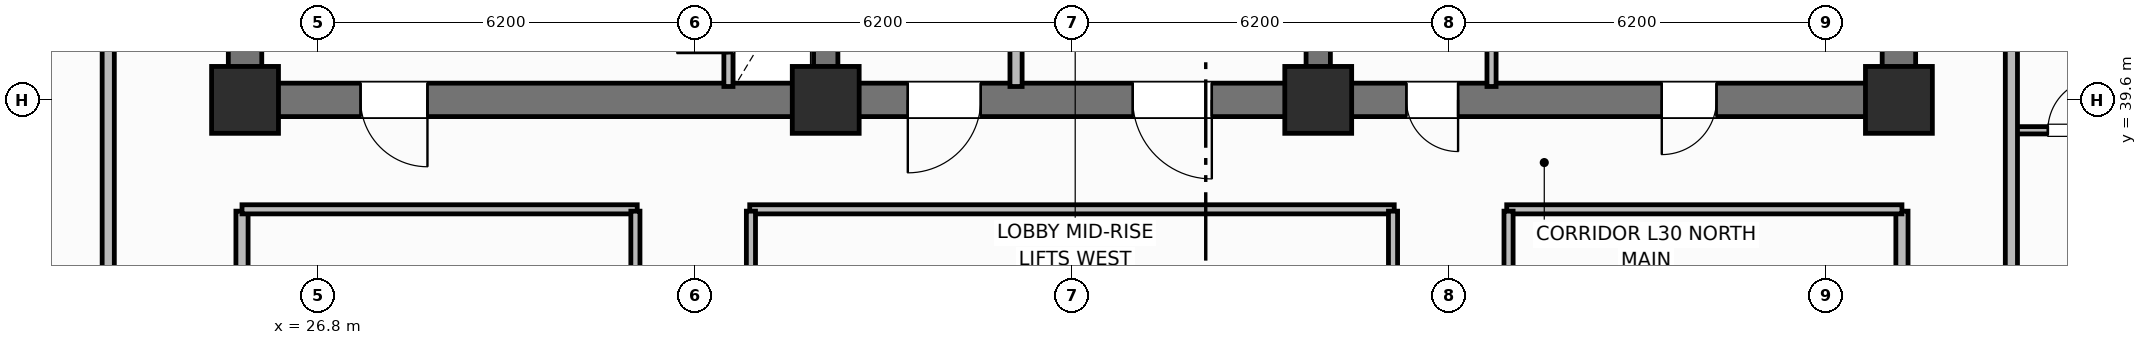
"""IFC4 building model, lengths in metres.
Left out: names, types, materials, properties, quantities, classifications, styles, units other than length and angle.
Written with IfcOpenShell. Run it as: python <this file> out.ifc"""

import sys

from ifc_helpers import new_model, si_unit, direction, frame, frame_2d, origin, origin_2d, place, context, subcontext, project, spatial, rectangle, extrude, element, fill, save


model = new_model("IFC4")
c1 = context("Model", 3, precision=1e-05, world=origin(), true_north=direction((0.0, 1.0)))
c2 = subcontext(c1, "Body", "Model", "MODEL_VIEW")
j1 = project(units=[si_unit("LENGTHUNIT", "METRE"), si_unit("PLANEANGLEUNIT", "RADIAN")], contexts=[c1])
p1 = place(None, origin())
s1 = spatial("IfcSite", under=j1, at=p1, CompositionType="ELEMENT")
p2 = place(p1, origin())
s2 = spatial("IfcBuilding", under=s1, at=p2, CompositionType="ELEMENT")
p3 = place(p2, frame((0.0, 0.0, 121.6)))
s3 = spatial("IfcBuildingStorey", under=s2, at=p3, CompositionType="ELEMENT", Elevation=121.6)
for number, where, z_axis, x_axis in (
    (1, (25.6, 39.875, 0.0), (0.0, 0.0, 1.0), (0.0, 1.0, 0.0)),
    (2, (52.8, 39.875, 0.0), (0.0, 0.0, 1.0), (0.0, 1.0, 0.0)),
):
    element("IfcWall", number, at=place(p3, frame(where, z_axis=z_axis, x_axis=x_axis)), inside=s3, PredefinedType="SHEAR", context=c2, shape_type="SweptSolid", body=[
        extrude(rectangle(XDim=5.65, YDim=0.55, at=frame_2d((2.825, 0.0))), origin(), (0.0, 0.0, 1.0), 3.7),
    ])
p4 = place(p3, frame((52.8, 39.6, 0.0), z_axis=(0.0, 0.0, 1.0), x_axis=(-1.0, 0.0, 0.0)))
e3 = element("IfcWall", 3, at=p4, inside=s3, PredefinedType="SHEAR", context=c2, shape_type="SweptSolid", body=[
    extrude(rectangle(XDim=27.2, YDim=0.55, at=frame_2d((13.6, 0.0))), origin(), (0.0, 0.0, 1.0), 3.7),
])
p5 = place(p4, frame((24.2, 0.0, 0.0)))
e4 = element("IfcOpeningElement", 4, at=p5, cuts=e3, PredefinedType="OPENING", context=c2, shape_type="SweptSolid", body=[
    extrude(rectangle(XDim=1.1, YDim=2.15, at=frame_2d((0.55, 1.075))), frame((0.0, 0.285, 0.0), z_axis=(0.0, -1.0, 0.0), x_axis=(1.0, 0.0, 0.0)), (0.0, 0.0, 1.0), 0.57),
])
p6 = place(p4, frame((15.1, 0.0, 0.0)))
e5 = element("IfcOpeningElement", 5, at=p6, cuts=e3, PredefinedType="OPENING", context=c2, shape_type="SweptSolid", body=[
    extrude(rectangle(XDim=1.2, YDim=2.15, at=frame_2d((0.6, 1.075))), frame((0.0, 0.285, 0.0), z_axis=(0.0, -1.0, 0.0), x_axis=(1.0, 0.0, 0.0)), (0.0, 0.0, 1.0), 0.57),
])
p7 = place(p4, frame((11.3, 0.0, 0.0)))
e6 = element("IfcOpeningElement", 6, at=p7, cuts=e3, PredefinedType="OPENING", context=c2, shape_type="SweptSolid", body=[
    extrude(rectangle(XDim=1.3, YDim=2.2, at=frame_2d((0.65, 1.1))), frame((0.0, 0.285, 0.0), z_axis=(0.0, -1.0, 0.0), x_axis=(1.0, 0.0, 0.0)), (0.0, 0.0, 1.0), 0.57),
])
p8 = place(p4, frame((7.25, 0.0, 0.0)))
e7 = element("IfcOpeningElement", 7, at=p8, cuts=e3, PredefinedType="OPENING", context=c2, shape_type="SweptSolid", body=[
    extrude(rectangle(XDim=0.85, YDim=2.1, at=frame_2d((0.425, 1.05))), frame((0.0, 0.285, 0.0), z_axis=(0.0, -1.0, 0.0), x_axis=(1.0, 0.0, 0.0)), (0.0, 0.0, 1.0), 0.57),
])
p9 = place(p4, frame((3.0, 0.0, 0.0)))
e8 = element("IfcOpeningElement", 8, at=p9, cuts=e3, PredefinedType="OPENING", context=c2, shape_type="SweptSolid", body=[
    extrude(rectangle(XDim=0.9, YDim=2.1, at=frame_2d((0.45, 1.05))), frame((0.0, 0.285, 0.0), z_axis=(0.0, -1.0, 0.0), x_axis=(1.0, 0.0, 0.0)), (0.0, 0.0, 1.0), 0.57),
])
for number, where, z_axis, x_axis in (
    (9, (35.15, 39.875, 0.0), (0.0, 0.0, 1.0), (0.0, 1.0, 0.0)),
    (10, (43.25, 39.875, 0.0), (0.0, 0.0, 1.0), (0.0, 1.0, 0.0)),
):
    element("IfcWall", number, at=place(p3, frame(where, z_axis=z_axis, x_axis=x_axis)), inside=s3, PredefinedType="SHEAR", context=c2, shape_type="SweptSolid", body=[
        extrude(rectangle(XDim=5.65, YDim=0.4, at=frame_2d((2.825, 0.0))), origin(), (0.0, 0.0, 1.0), 3.7),
    ])
for number, where, z_axis, x_axis in (
    (11, (25.6, 39.6, 0.0), (0.0, 0.0, 1.0), (1.0, 0.0, 0.0)),
    (12, (35.15, 39.6, 0.0), (0.0, 0.0, 1.0), (1.0, 0.0, 0.0)),
    (13, (43.25, 39.6, 0.0), (0.0, 0.0, 1.0), (1.0, 0.0, 0.0)),
    (14, (52.8, 39.6, 0.0), (0.0, 0.0, 1.0), (1.0, 0.0, 0.0)),
):
    element("IfcColumn", number, at=place(p3, frame(where, z_axis=z_axis, x_axis=x_axis)), inside=s3, PredefinedType="COLUMN", context=c2, shape_type="SweptSolid", body=[
        extrude(rectangle(XDim=1.1, YDim=1.1, at=origin_2d()), origin(), (0.0, 0.0, 1.0), 3.7),
    ])
p10 = place(p3, frame((33.55, 39.82, 0.0), z_axis=(0.0, 0.0, 1.0), x_axis=(0.0, 1.0, 0.0)))
e15 = element("IfcWall", 15, at=p10, inside=s3, PredefinedType="PARTITIONING", context=c2, shape_type="SweptSolid", body=[
    extrude(rectangle(XDim=2.13, YDim=0.15, at=frame_2d((1.065, 0.0))), origin(), (0.0, 0.0, 1.0), 2.53),
])
p11 = place(p10, frame((0.55, 0.0, 0.0)))
e16 = element("IfcOpeningElement", 16, at=p11, cuts=e15, PredefinedType="OPENING", context=c2, shape_type="SweptSolid", body=[
    extrude(rectangle(XDim=0.85, YDim=2.05, at=frame_2d((0.425, 1.025))), frame((0.0, 0.085, 0.0), z_axis=(0.0, -1.0, 0.0), x_axis=(1.0, 0.0, 0.0)), (0.0, 0.0, 1.0), 0.17),
])
p12 = place(p3, frame((38.28, 39.82, 0.0), z_axis=(0.0, 0.0, 1.0), x_axis=(0.0, 1.0, 0.0)))
e17 = element("IfcWall", 17, at=p12, inside=s3, PredefinedType="PARTITIONING", context=c2, shape_type="SweptSolid", body=[
    extrude(rectangle(XDim=2.73, YDim=0.2, at=frame_2d((1.365, 0.0))), origin(), (0.0, 0.0, 1.0), 2.53),
])
p13 = place(p3, frame((46.1, 39.82, 0.0), z_axis=(0.0, 0.0, 1.0), x_axis=(0.0, 1.0, 0.0)))
e18 = element("IfcWall", 18, at=p13, inside=s3, PredefinedType="PARTITIONING", context=c2, shape_type="SweptSolid", body=[
    extrude(rectangle(XDim=2.73, YDim=0.15, at=frame_2d((1.365, 0.0))), origin(), (0.0, 0.0, 1.0), 2.53),
])
for number, where, z_axis, x_axis in (
    (19, (25.55, 18.63, 0.0), (0.0, 0.0, 1.0), (0.0, 1.0, 0.0)),
    (20, (52.85, 18.63, 0.0), (0.0, 0.0, 1.0), (0.0, 1.0, 0.0)),
):
    element("IfcWall", number, at=place(p3, frame(where, z_axis=z_axis, x_axis=x_axis)), inside=s3, PredefinedType="PARTITIONING", context=c2, shape_type="SweptSolid", body=[
        extrude(rectangle(XDim=19.14, YDim=0.2, at=frame_2d((9.57, 0.0))), origin(), (0.0, 0.0, 1.0), 2.53),
    ])
p14 = place(p3, frame((25.55, 37.8, 0.0), z_axis=(0.0, 0.0, 1.0), x_axis=(1.0, 0.0, 0.0)))
e21 = element("IfcWall", 21, at=p14, inside=s3, PredefinedType="PARTITIONING", context=c2, shape_type="SweptSolid", body=[
    extrude(rectangle(XDim=6.5, YDim=0.15, at=frame_2d((3.25, 0.0))), origin(), (0.0, 0.0, 1.0), 2.53),
])
p15 = place(p3, frame((33.9, 37.8, 0.0), z_axis=(0.0, 0.0, 1.0), x_axis=(1.0, 0.0, 0.0)))
e22 = element("IfcWall", 22, at=p15, inside=s3, PredefinedType="PARTITIONING", context=c2, shape_type="SweptSolid", body=[
    extrude(rectangle(XDim=10.6, YDim=0.15, at=frame_2d((5.3, 0.0))), origin(), (0.0, 0.0, 1.0), 2.53),
])
p16 = place(p3, frame((46.35, 37.8, 0.0), z_axis=(0.0, 0.0, 1.0), x_axis=(1.0, 0.0, 0.0)))
e23 = element("IfcWall", 23, at=p16, inside=s3, PredefinedType="PARTITIONING", context=c2, shape_type="SweptSolid", body=[
    extrude(rectangle(XDim=6.5, YDim=0.15, at=frame_2d((3.25, 0.0))), origin(), (0.0, 0.0, 1.0), 2.53),
])
p17 = place(p3, frame((32.02, 18.63, 0.0), z_axis=(0.0, 0.0, 1.0), x_axis=(0.0, 1.0, 0.0)))
e24 = element("IfcWall", 24, at=p17, inside=s3, PredefinedType="PARTITIONING", context=c2, shape_type="SweptSolid", body=[
    extrude(rectangle(XDim=19.14, YDim=0.15, at=frame_2d((9.57, 0.0))), origin(), (0.0, 0.0, 1.0), 2.53),
])
p18 = place(p17, frame((5.0, 0.0, 0.0)))
e25 = element("IfcOpeningElement", 25, at=p18, cuts=e24, PredefinedType="OPENING", context=c2, shape_type="SweptSolid", body=[
    extrude(rectangle(XDim=0.9, YDim=2.1, at=frame_2d((0.45, 1.05))), frame((0.0, 0.085, 0.0), z_axis=(0.0, -1.0, 0.0), x_axis=(1.0, 0.0, 0.0)), (0.0, 0.0, 1.0), 0.17),
])
p19 = place(p3, frame((33.92, 18.63, 0.0), z_axis=(0.0, 0.0, 1.0), x_axis=(0.0, 1.0, 0.0)))
e26 = element("IfcWall", 26, at=p19, inside=s3, PredefinedType="PARTITIONING", context=c2, shape_type="SweptSolid", body=[
    extrude(rectangle(XDim=19.14, YDim=0.15, at=frame_2d((9.57, 0.0))), origin(), (0.0, 0.0, 1.0), 2.53),
])
p20 = place(p19, frame((6.5, 0.0, 0.0)))
e27 = element("IfcOpeningElement", 27, at=p20, cuts=e26, PredefinedType="OPENING", context=c2, shape_type="SweptSolid", body=[
    extrude(rectangle(XDim=1.0, YDim=2.15, at=frame_2d((0.5, 1.075))), frame((0.0, 0.085, 0.0), z_axis=(0.0, -1.0, 0.0), x_axis=(1.0, 0.0, 0.0)), (0.0, 0.0, 1.0), 0.17),
])
p21 = place(p3, frame((44.48, 18.63, 0.0), z_axis=(0.0, 0.0, 1.0), x_axis=(0.0, 1.0, 0.0)))
e28 = element("IfcWall", 28, at=p21, inside=s3, PredefinedType="PARTITIONING", context=c2, shape_type="SweptSolid", body=[
    extrude(rectangle(XDim=19.14, YDim=0.15, at=frame_2d((9.57, 0.0))), origin(), (0.0, 0.0, 1.0), 2.53),
])
p22 = place(p3, frame((46.38, 18.63, 0.0), z_axis=(0.0, 0.0, 1.0), x_axis=(0.0, 1.0, 0.0)))
e29 = element("IfcWall", 29, at=p22, inside=s3, PredefinedType="PARTITIONING", context=c2, shape_type="SweptSolid", body=[
    extrude(rectangle(XDim=19.14, YDim=0.15, at=frame_2d((9.57, 0.0))), origin(), (0.0, 0.0, 1.0), 2.53),
])
p23 = place(p22, frame((3.0, 0.0, 0.0)))
e30 = element("IfcOpeningElement", 30, at=p23, cuts=e29, PredefinedType="OPENING", context=c2, shape_type="SweptSolid", body=[
    extrude(rectangle(XDim=0.9, YDim=2.1, at=frame_2d((0.45, 1.05))), frame((0.0, 0.085, 0.0), z_axis=(0.0, -1.0, 0.0), x_axis=(1.0, 0.0, 0.0)), (0.0, 0.0, 1.0), 0.17),
])
p24 = place(p22, frame((11.5, 0.0, 0.0)))
e31 = element("IfcOpeningElement", 31, at=p24, cuts=e29, PredefinedType="OPENING", context=c2, shape_type="SweptSolid", body=[
    extrude(rectangle(XDim=0.9, YDim=2.1, at=frame_2d((0.45, 1.05))), frame((0.0, 0.085, 0.0), z_axis=(0.0, -1.0, 0.0), x_axis=(1.0, 0.0, 0.0)), (0.0, 0.0, 1.0), 0.17),
])
p25 = place(p3, frame((23.35, 10.6, 0.0), z_axis=(0.0, 0.0, 1.0), x_axis=(0.0, 1.0, 0.0)))
e32 = element("IfcWall", 32, at=p25, inside=s3, PredefinedType="PARTITIONING", context=c2, shape_type="SweptSolid", body=[
    extrude(rectangle(XDim=35.2, YDim=0.2, at=frame_2d((17.6, 0.0))), origin(), (0.0, 0.0, 1.0), 2.53),
])
p26 = place(p25, frame((2.65, 0.0, 0.0)))
e33 = element("IfcOpeningElement", 33, at=p26, cuts=e32, PredefinedType="OPENING", context=c2, shape_type="SweptSolid", body=[
    extrude(rectangle(XDim=1.0, YDim=2.15, at=frame_2d((0.5, 1.075))), frame((0.0, 0.11, 0.0), z_axis=(0.0, -1.0, 0.0), x_axis=(1.0, 0.0, 0.0)), (0.0, 0.0, 1.0), 0.22),
])
p27 = place(p25, frame((19.95, 0.0, 0.0)))
e34 = element("IfcOpeningElement", 34, at=p27, cuts=e32, PredefinedType="OPENING", context=c2, shape_type="SweptSolid", body=[
    extrude(rectangle(XDim=1.0, YDim=2.15, at=frame_2d((0.5, 1.075))), frame((0.0, 0.11, 0.0), z_axis=(0.0, -1.0, 0.0), x_axis=(1.0, 0.0, 0.0)), (0.0, 0.0, 1.0), 0.22),
])
p28 = place(p3, frame((54.65, 39.1, 0.0), z_axis=(0.0, 0.0, 1.0), x_axis=(1.0, 0.0, 0.0)))
e35 = element("IfcWall", 35, at=p28, inside=s3, PredefinedType="PARTITIONING", context=c2, shape_type="SweptSolid", body=[
    extrude(rectangle(XDim=2.25, YDim=0.12, at=frame_2d((1.125, 0.0))), origin(), (0.0, 0.0, 1.0), 2.53),
])
p29 = place(p28, frame((0.6, 0.0, 0.0)))
e36 = element("IfcOpeningElement", 36, at=p29, cuts=e35, PredefinedType="OPENING", context=c2, shape_type="SweptSolid", body=[
    extrude(rectangle(XDim=0.85, YDim=2.1, at=frame_2d((0.425, 1.05))), frame((0.0, 0.07, 0.0), z_axis=(0.0, -1.0, 0.0), x_axis=(1.0, 0.0, 0.0)), (0.0, 0.0, 1.0), 0.14),
])
p30 = place(p3, frame((54.65, 10.6, 0.0), z_axis=(0.0, 0.0, 1.0), x_axis=(0.0, 1.0, 0.0)))
e37 = element("IfcWall", 37, at=p30, inside=s3, PredefinedType="PARTITIONING", context=c2, shape_type="SweptSolid", body=[
    extrude(rectangle(XDim=35.2, YDim=0.2, at=frame_2d((17.6, 0.0))), origin(), (0.0, 0.0, 1.0), 2.53),
])
p31 = place(p30, frame((2.65, 0.0, 0.0)))
e38 = element("IfcOpeningElement", 38, at=p31, cuts=e37, PredefinedType="OPENING", context=c2, shape_type="SweptSolid", body=[
    extrude(rectangle(XDim=1.0, YDim=2.15, at=frame_2d((0.5, 1.075))), frame((0.0, 0.11, 0.0), z_axis=(0.0, -1.0, 0.0), x_axis=(1.0, 0.0, 0.0)), (0.0, 0.0, 1.0), 0.22),
])
p32 = place(p30, frame((12.518, 0.0, 0.0)))
e39 = element("IfcOpeningElement", 39, at=p32, cuts=e37, PredefinedType="OPENING", context=c2, shape_type="SweptSolid", body=[
    extrude(rectangle(XDim=1.0, YDim=2.15, at=frame_2d((0.5, 1.075))), frame((0.0, 0.11, 0.0), z_axis=(0.0, -1.0, 0.0), x_axis=(1.0, 0.0, 0.0)), (0.0, 0.0, 1.0), 0.22),
])
p33 = place(p30, frame((23.65, 0.0, 0.0)))
e40 = element("IfcOpeningElement", 40, at=p33, cuts=e37, PredefinedType="OPENING", context=c2, shape_type="SweptSolid", body=[
    extrude(rectangle(XDim=1.0, YDim=2.15, at=frame_2d((0.5, 1.075))), frame((0.0, 0.11, 0.0), z_axis=(0.0, -1.0, 0.0), x_axis=(1.0, 0.0, 0.0)), (0.0, 0.0, 1.0), 0.22),
])
p34 = place(p11, origin())
e41 = element("IfcDoor", 41, at=p34, inside=s3, OperationType="SINGLE_SWING_LEFT", PredefinedType="TRAPDOOR", context=c2, shape_type="SweptSolid", body=[
    extrude(rectangle(XDim=0.85, YDim=2.05, at=frame_2d((0.425, 1.025))), frame((0.0, 0.025, 0.0), z_axis=(0.0, -1.0, 0.0), x_axis=(1.0, 0.0, 0.0)), (0.0, 0.0, 1.0), 0.05),
])
fill(e16, e41)
p35 = place(p29, origin())
e42 = element("IfcDoor", 42, at=p35, inside=s3, OperationType="SINGLE_SWING_RIGHT", PredefinedType="DOOR", context=c2, shape_type="SweptSolid", body=[
    extrude(rectangle(XDim=0.85, YDim=2.1, at=frame_2d((0.425, 1.05))), frame((0.0, 0.025, 0.0), z_axis=(0.0, -1.0, 0.0), x_axis=(1.0, 0.0, 0.0)), (0.0, 0.0, 1.0), 0.05),
])
fill(e36, e42)
p36 = place(p5, origin())
e43 = element("IfcDoor", 43, at=p36, inside=s3, OperationType="SINGLE_SWING_LEFT", PredefinedType="DOOR", context=c2, shape_type="SweptSolid", body=[
    extrude(rectangle(XDim=1.1, YDim=2.15, at=frame_2d((0.55, 1.075))), frame((0.0, 0.025, 0.0), z_axis=(0.0, -1.0, 0.0), x_axis=(1.0, 0.0, 0.0)), (0.0, 0.0, 1.0), 0.05),
])
fill(e4, e43)
p37 = place(p6, origin())
e44 = element("IfcDoor", 44, at=p37, inside=s3, OperationType="SINGLE_SWING_RIGHT", PredefinedType="DOOR", context=c2, shape_type="SweptSolid", body=[
    extrude(rectangle(XDim=1.2, YDim=2.15, at=frame_2d((0.6, 1.075))), frame((0.0, 0.025, 0.0), z_axis=(0.0, -1.0, 0.0), x_axis=(1.0, 0.0, 0.0)), (0.0, 0.0, 1.0), 0.05),
])
fill(e5, e44)
p38 = place(p7, origin())
e45 = element("IfcDoor", 45, at=p38, inside=s3, OperationType="SINGLE_SWING_LEFT", PredefinedType="DOOR", context=c2, shape_type="SweptSolid", body=[
    extrude(rectangle(XDim=1.3, YDim=2.2, at=frame_2d((0.65, 1.1))), frame((0.0, 0.025, 0.0), z_axis=(0.0, -1.0, 0.0), x_axis=(1.0, 0.0, 0.0)), (0.0, 0.0, 1.0), 0.05),
])
fill(e6, e45)
p39 = place(p8, origin())
e46 = element("IfcDoor", 46, at=p39, inside=s3, OperationType="SINGLE_SWING_LEFT", PredefinedType="DOOR", context=c2, shape_type="SweptSolid", body=[
    extrude(rectangle(XDim=0.85, YDim=2.1, at=frame_2d((0.425, 1.05))), frame((0.0, 0.025, 0.0), z_axis=(0.0, -1.0, 0.0), x_axis=(1.0, 0.0, 0.0)), (0.0, 0.0, 1.0), 0.05),
])
fill(e7, e46)
p40 = place(p9, origin())
e47 = element("IfcDoor", 47, at=p40, inside=s3, OperationType="SINGLE_SWING_RIGHT", PredefinedType="DOOR", context=c2, shape_type="SweptSolid", body=[
    extrude(rectangle(XDim=0.9, YDim=2.1, at=frame_2d((0.45, 1.05))), frame((0.0, 0.025, 0.0), z_axis=(0.0, -1.0, 0.0), x_axis=(1.0, 0.0, 0.0)), (0.0, 0.0, 1.0), 0.05),
])
fill(e8, e47)
save(model, sys.argv[1])
